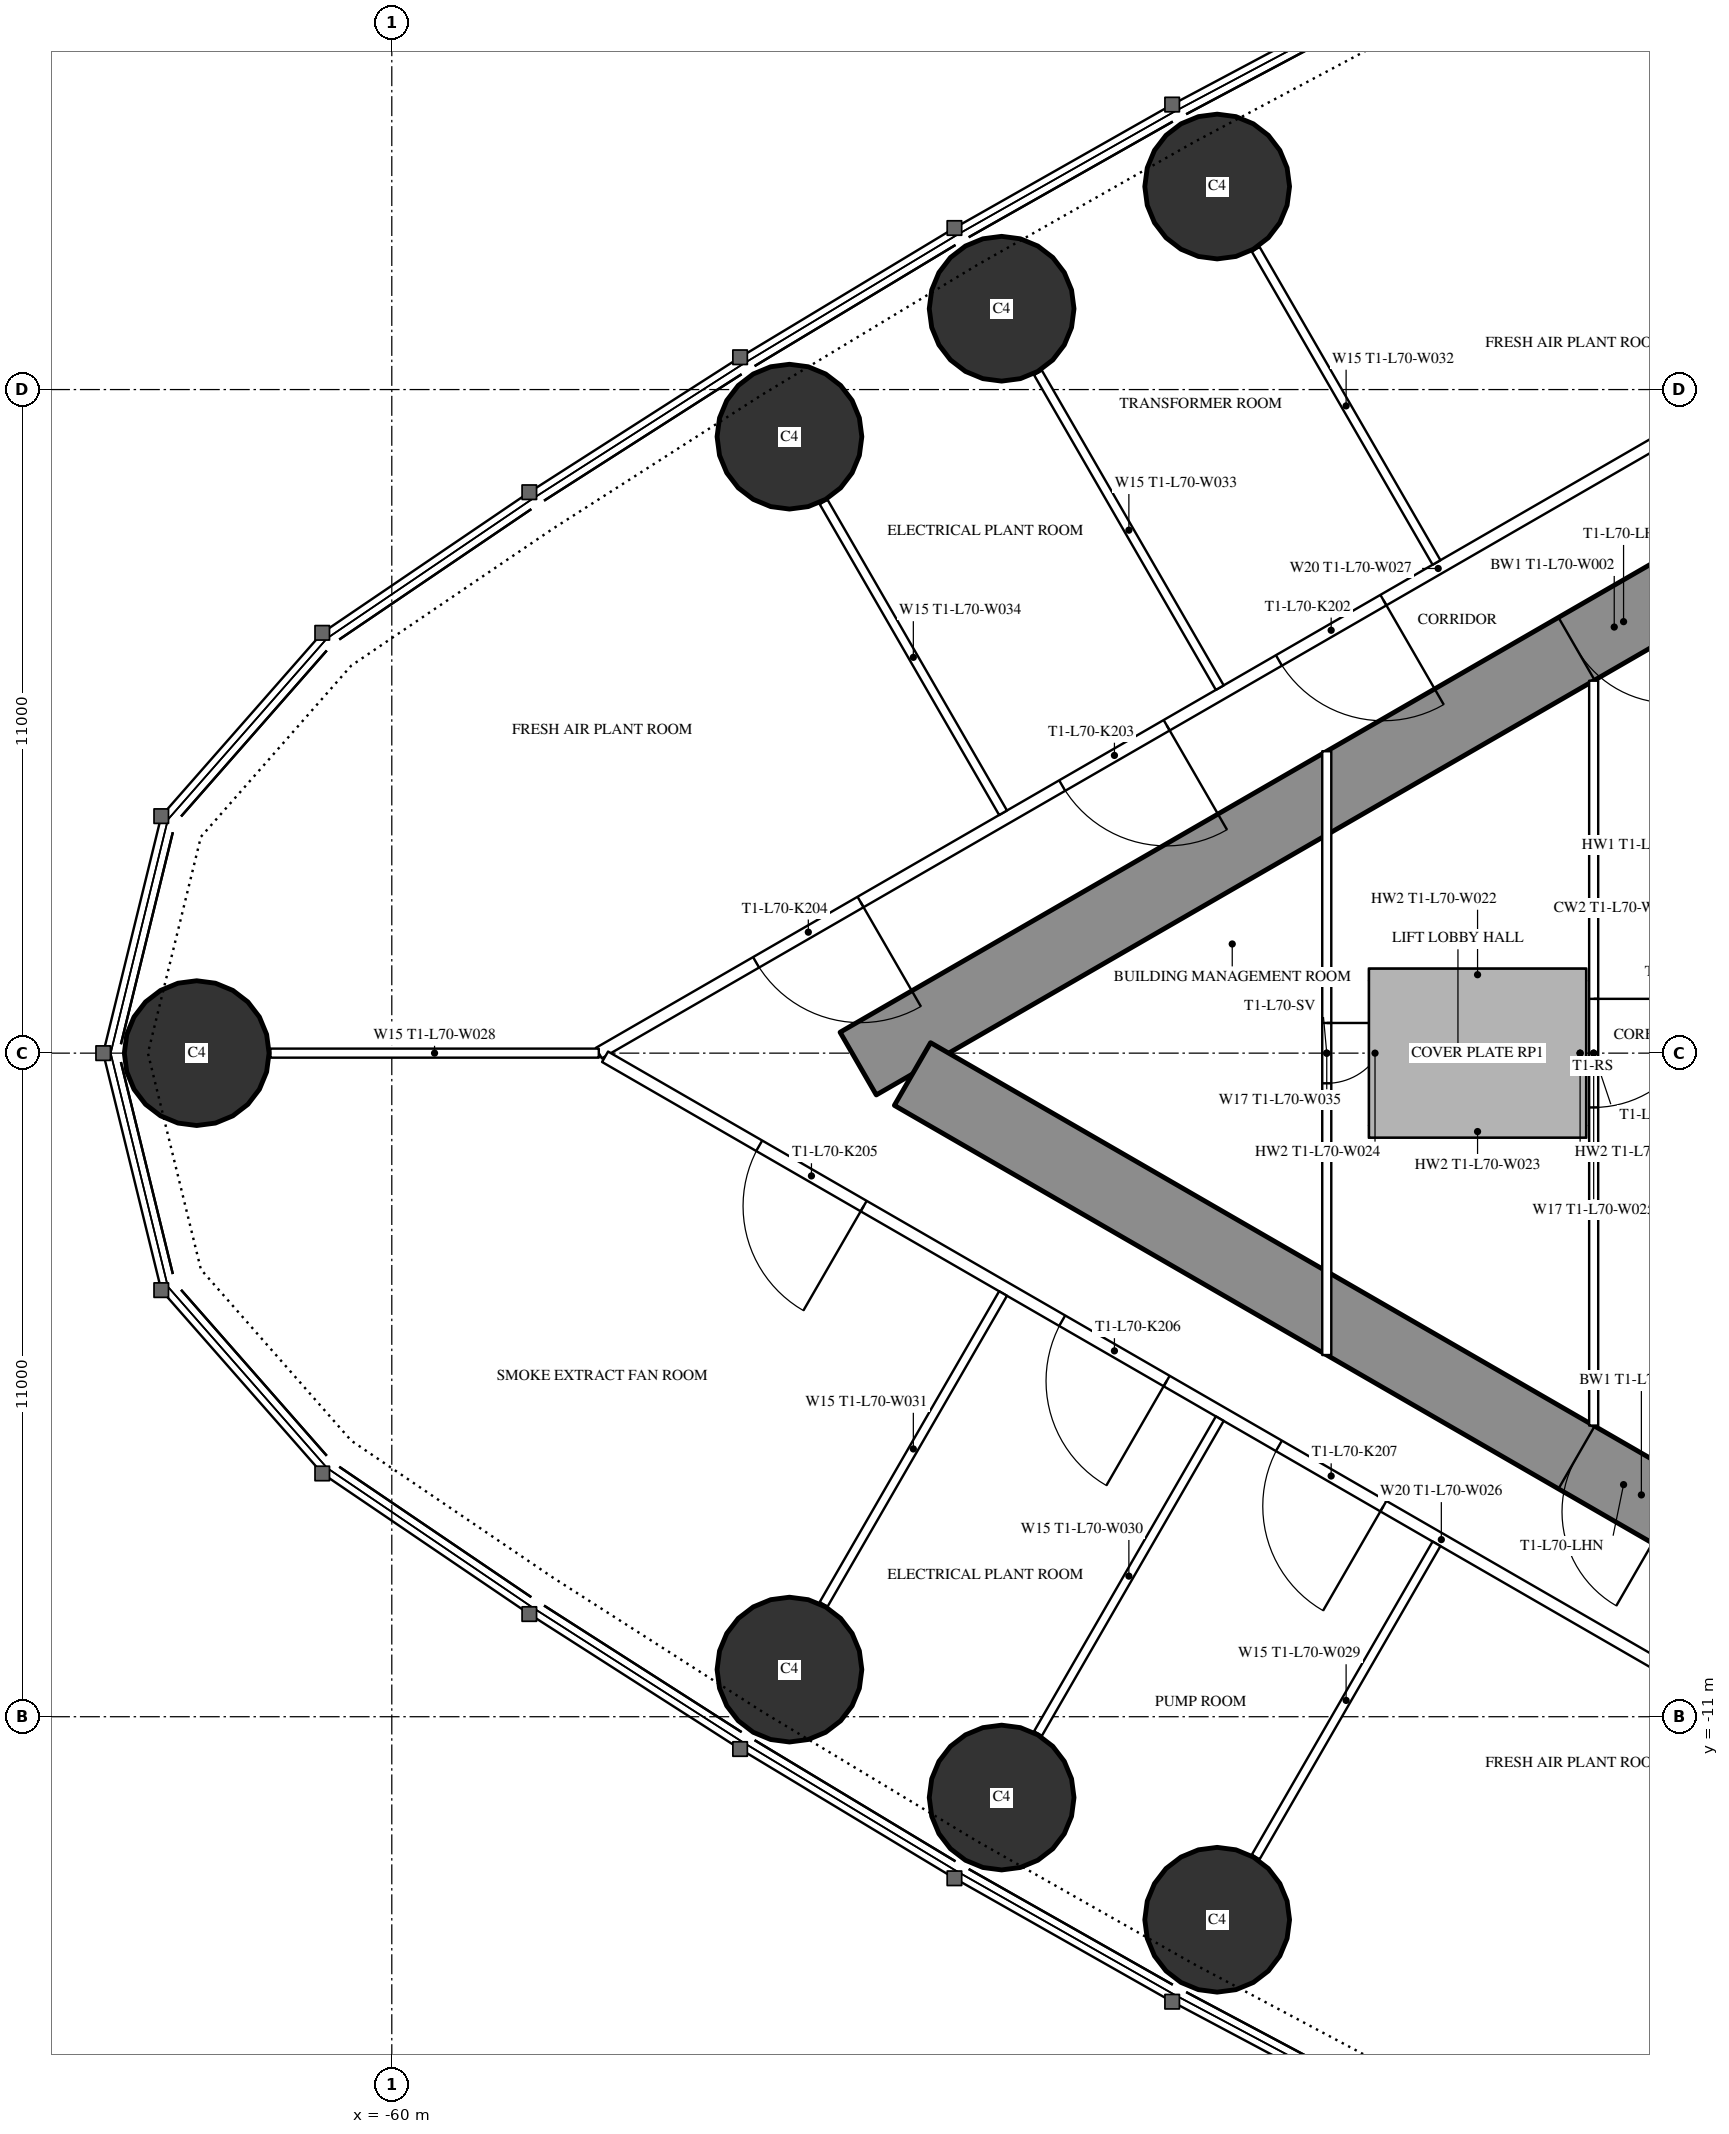
"""IFC4 building model, lengths in metres.
Left out: names, types, materials, properties, quantities, classifications, styles, units other than length and angle.
Written with IfcOpenShell. Run it as: python <this file> out.ifc"""

import sys

from ifc_helpers import new_model, si_unit, direction, frame, frame_2d, origin, origin_2d, place, context, subcontext, project, spatial, rectangle, circle, extrude, element, fill, save


model = new_model("IFC4")
c1 = context("Model", 3, precision=1e-05, world=origin(), true_north=direction((0.0, 1.0)))
c2 = subcontext(c1, "Body", "Model", "MODEL_VIEW")
j1 = project(units=[si_unit("LENGTHUNIT", "METRE"), si_unit("PLANEANGLEUNIT", "RADIAN")], contexts=[c1])
p1 = place(None, origin())
s1 = spatial("IfcSite", under=j1, at=p1, CompositionType="ELEMENT")
p2 = place(p1, origin())
s2 = spatial("IfcBuilding", under=s1, at=p2, CompositionType="ELEMENT")
p3 = place(p2, frame((0.0, 0.0, 268.3)))
s3 = spatial("IfcBuildingStorey", under=s2, at=p3, CompositionType="ELEMENT", Elevation=268.3)
for number, where, z_axis, x_axis in (
    (1, (-63.234, 0.0, 0.0), (0.0, 0.0, 1.0), (1.0, 0.0, 0.0)),
    (2, (-53.408, -10.219, 0.0), (0.0, 0.0, 1.0), (1.0, 0.0, 0.0)),
    (3, (-49.89, -12.34, 0.0), (0.0, 0.0, 1.0), (1.0, 0.0, 0.0)),
    (4, (-46.317, -14.365, 0.0), (0.0, 0.0, 1.0), (1.0, 0.0, 0.0)),
    (5, (-46.317, 14.365, 0.0), (0.0, 0.0, 1.0), (1.0, 0.0, 0.0)),
    (6, (-49.89, 12.34, 0.0), (0.0, 0.0, 1.0), (1.0, 0.0, 0.0)),
    (7, (-53.408, 10.219, 0.0), (0.0, 0.0, 1.0), (1.0, 0.0, 0.0)),
):
    element("IfcColumn", number, at=place(p3, frame(where, z_axis=z_axis, x_axis=x_axis)), inside=s3, PredefinedType="COLUMN", context=c2, shape_type="SweptSolid", body=[
        extrude(circle(Radius=1.2, at=origin_2d()), origin(), (0.0, 0.0, 1.0), 5.0),
    ])
p4 = place(p3, frame((-27.2, 14.3, 0.0), z_axis=(0.0, 0.0, 1.0), x_axis=(-0.866026593062, -0.499997940104, 0.0)))
e8 = element("IfcWall", 8, at=p4, inside=s3, PredefinedType="SHEAR", context=c2, shape_type="SweptSolid", body=[
    extrude(rectangle(XDim=28.946, YDim=1.2, at=frame_2d((14.473, 0.0))), origin(), (0.0, 0.0, 1.0), 5.0),
])
p5 = place(p4, frame((4.6, 0.0, 0.0)))
e9 = element("IfcOpeningElement", 9, at=p5, cuts=e8, PredefinedType="OPENING", context=c2, shape_type="SweptSolid", body=[
    extrude(rectangle(XDim=1.0, YDim=2.2, at=frame_2d((0.5, 1.1))), frame((0.0, 0.61, 0.0), z_axis=(0.0, -1.0, 0.0), x_axis=(1.0, 0.0, 0.0)), (0.0, 0.0, 1.0), 1.22),
])
p6 = place(p4, frame((13.395, 0.0, 0.0)))
e10 = element("IfcOpeningElement", 10, at=p6, cuts=e8, PredefinedType="OPENING", context=c2, shape_type="SweptSolid", body=[
    extrude(rectangle(XDim=1.8, YDim=2.2, at=frame_2d((0.9, 1.1))), frame((0.0, 0.61, 0.0), z_axis=(0.0, -1.0, 0.0), x_axis=(1.0, 0.0, 0.0)), (0.0, 0.0, 1.0), 1.22),
])
p7 = place(p3, frame((-27.2, -14.3, 0.0), z_axis=(0.0, 0.0, 1.0), x_axis=(-0.866024021859, 0.500002393557, 0.0)))
e11 = element("IfcWall", 11, at=p7, inside=s3, PredefinedType="SHEAR", context=c2, shape_type="SweptSolid", body=[
    extrude(rectangle(XDim=27.907, YDim=1.2, at=frame_2d((13.954, 0.0))), origin(), (0.0, 0.0, 1.0), 5.0),
])
p8 = place(p7, frame((4.6, 0.0, 0.0)))
e12 = element("IfcOpeningElement", 12, at=p8, cuts=e11, PredefinedType="OPENING", context=c2, shape_type="SweptSolid", body=[
    extrude(rectangle(XDim=1.0, YDim=2.2, at=frame_2d((0.5, 1.1))), frame((0.0, 0.61, 0.0), z_axis=(0.0, -1.0, 0.0), x_axis=(1.0, 0.0, 0.0)), (0.0, 0.0, 1.0), 1.22),
])
p9 = place(p7, frame((13.395, 0.0, 0.0)))
e13 = element("IfcOpeningElement", 13, at=p9, cuts=e11, PredefinedType="OPENING", context=c2, shape_type="SweptSolid", body=[
    extrude(rectangle(XDim=1.8, YDim=2.2, at=frame_2d((0.9, 1.1))), frame((0.0, 0.61, 0.0), z_axis=(0.0, -1.0, 0.0), x_axis=(1.0, 0.0, 0.0)), (0.0, 0.0, 1.0), 1.22),
])
for number, where, z_axis, x_axis in (
    (14, (-43.8, -1.3, 5.0), (0.0, 0.0, 1.0), (1.0, 0.0, 0.0)),
    (15, (-40.2, 1.3, 5.0), (0.0, 0.0, 1.0), (-1.0, 0.0, 0.0)),
):
    element("IfcWall", number, at=place(p3, frame(where, z_axis=z_axis, x_axis=x_axis)), inside=s3, PredefinedType="SOLIDWALL", context=c2, shape_type="SweptSolid", body=[
        extrude(rectangle(XDim=3.6, YDim=0.2, at=frame_2d((1.8, 0.0))), origin(), (0.0, 0.0, 1.0), 2.6),
    ])
p10 = place(p3, frame((-43.7, 1.2, 5.0), z_axis=(0.0, 0.0, 1.0), x_axis=(0.0, -1.0, 0.0)))
e16 = element("IfcWall", 16, at=p10, inside=s3, PredefinedType="SOLIDWALL", context=c2, shape_type="SweptSolid", body=[
    extrude(rectangle(XDim=2.4, YDim=0.2, at=frame_2d((1.2, 0.0))), origin(), (0.0, 0.0, 1.0), 2.6),
])
p11 = place(p3, frame((-40.3, -1.2, 5.0), z_axis=(0.0, 0.0, 1.0), x_axis=(0.0, 1.0, 0.0)))
e17 = element("IfcWall", 17, at=p11, inside=s3, PredefinedType="SOLIDWALL", context=c2, shape_type="SweptSolid", body=[
    extrude(rectangle(XDim=2.4, YDim=0.2, at=frame_2d((1.2, 0.0))), origin(), (0.0, 0.0, 1.0), 2.6),
])
p12 = place(p11, frame((0.7, 0.0, 0.0)))
e18 = element("IfcOpeningElement", 18, at=p12, cuts=e17, PredefinedType="OPENING", context=c2, shape_type="SweptSolid", body=[
    extrude(rectangle(XDim=1.0, YDim=2.2, at=frame_2d((0.5, 1.1))), frame((0.0, 0.11, 0.0), z_axis=(0.0, -1.0, 0.0), x_axis=(1.0, 0.0, 0.0)), (0.0, 0.0, 1.0), 0.22),
])
p13 = place(p3, frame((-28.737, 16.068, 0.0), z_axis=(0.0, 0.0, 1.0), x_axis=(-0.866026057212, -0.499998868229, 0.0)))
e19 = element("IfcWall", 19, at=p13, inside=s3, PredefinedType="PARTITIONING", context=c2, shape_type="SweptSolid", body=[
    extrude(rectangle(XDim=32.137, YDim=0.2, at=frame_2d((16.068, 0.0))), origin(), (0.0, 0.0, 1.0), 4.7),
])
p14 = place(p13, frame((7.134, 0.0, 0.0)))
e20 = element("IfcOpeningElement", 20, at=p14, cuts=e19, PredefinedType="OPENING", context=c2, shape_type="SweptSolid", body=[
    extrude(rectangle(XDim=2.0, YDim=2.4, at=frame_2d((1.0, 1.2))), frame((0.0, 0.11, 0.0), z_axis=(0.0, -1.0, 0.0), x_axis=(1.0, 0.0, 0.0)), (0.0, 0.0, 1.0), 0.22),
])
p15 = place(p13, frame((17.117, 0.0, 0.0)))
e21 = element("IfcOpeningElement", 21, at=p15, cuts=e19, PredefinedType="OPENING", context=c2, shape_type="SweptSolid", body=[
    extrude(rectangle(XDim=2.0, YDim=2.4, at=frame_2d((1.0, 1.2))), frame((0.0, 0.11, 0.0), z_axis=(0.0, -1.0, 0.0), x_axis=(1.0, 0.0, 0.0)), (0.0, 0.0, 1.0), 0.22),
])
p16 = place(p13, frame((21.266, 0.0, 0.0)))
e22 = element("IfcOpeningElement", 22, at=p16, cuts=e19, PredefinedType="OPENING", context=c2, shape_type="SweptSolid", body=[
    extrude(rectangle(XDim=2.0, YDim=2.4, at=frame_2d((1.0, 1.2))), frame((0.0, 0.11, 0.0), z_axis=(0.0, -1.0, 0.0), x_axis=(1.0, 0.0, 0.0)), (0.0, 0.0, 1.0), 0.22),
])
p17 = place(p13, frame((27.126, 0.0, 0.0)))
e23 = element("IfcOpeningElement", 23, at=p17, cuts=e19, PredefinedType="OPENING", context=c2, shape_type="SweptSolid", body=[
    extrude(rectangle(XDim=2.0, YDim=2.4, at=frame_2d((1.0, 1.2))), frame((0.0, 0.11, 0.0), z_axis=(0.0, -1.0, 0.0), x_axis=(1.0, 0.0, 0.0)), (0.0, 0.0, 1.0), 0.22),
])
p18 = place(p3, frame((-28.737, -16.068, 0.0), z_axis=(0.0, 0.0, 1.0), x_axis=(-0.866026220747, 0.499998584977, 0.0)))
e24 = element("IfcWall", 24, at=p18, inside=s3, PredefinedType="PARTITIONING", context=c2, shape_type="SweptSolid", body=[
    extrude(rectangle(XDim=32.017, YDim=0.2, at=frame_2d((16.008, 0.0))), origin(), (0.0, 0.0, 1.0), 4.7),
])
p19 = place(p18, frame((27.066, 0.0, 0.0)))
e25 = element("IfcOpeningElement", 25, at=p19, cuts=e24, PredefinedType="OPENING", context=c2, shape_type="SweptSolid", body=[
    extrude(rectangle(XDim=2.0, YDim=2.4, at=frame_2d((1.0, 1.2))), frame((0.0, 0.11, 0.0), z_axis=(0.0, -1.0, 0.0), x_axis=(1.0, 0.0, 0.0)), (0.0, 0.0, 1.0), 0.22),
])
p20 = place(p18, frame((21.266, 0.0, 0.0)))
e26 = element("IfcOpeningElement", 26, at=p20, cuts=e24, PredefinedType="OPENING", context=c2, shape_type="SweptSolid", body=[
    extrude(rectangle(XDim=2.0, YDim=2.4, at=frame_2d((1.0, 1.2))), frame((0.0, 0.11, 0.0), z_axis=(0.0, -1.0, 0.0), x_axis=(1.0, 0.0, 0.0)), (0.0, 0.0, 1.0), 0.22),
])
p21 = place(p18, frame((17.117, 0.0, 0.0)))
e27 = element("IfcOpeningElement", 27, at=p21, cuts=e24, PredefinedType="OPENING", context=c2, shape_type="SweptSolid", body=[
    extrude(rectangle(XDim=2.0, YDim=2.4, at=frame_2d((1.0, 1.2))), frame((0.0, 0.11, 0.0), z_axis=(0.0, -1.0, 0.0), x_axis=(1.0, 0.0, 0.0)), (0.0, 0.0, 1.0), 0.22),
])
p22 = place(p18, frame((7.134, 0.0, 0.0)))
e28 = element("IfcOpeningElement", 28, at=p22, cuts=e24, PredefinedType="OPENING", context=c2, shape_type="SweptSolid", body=[
    extrude(rectangle(XDim=2.0, YDim=2.4, at=frame_2d((1.0, 1.2))), frame((0.0, 0.11, 0.0), z_axis=(0.0, -1.0, 0.0), x_axis=(1.0, 0.0, 0.0)), (0.0, 0.0, 1.0), 0.22),
])
p23 = place(p3, frame((-42.68, 8.134, 0.0), z_axis=(0.0, 0.0, 1.0), x_axis=(-0.499984479505, 0.866034364361, 0.0)))
e29 = element("IfcWall", 29, at=p23, inside=s3, PredefinedType="PARTITIONING", context=c2, shape_type="SweptSolid", body=[
    extrude(rectangle(XDim=5.995, YDim=0.15, at=frame_2d((2.998, 0.0))), origin(), (0.0, 0.0, 1.0), 3.8),
])
p24 = place(p3, frame((-46.274, 6.059, 0.0), z_axis=(0.0, 0.0, 1.0), x_axis=(-0.500020471368, 0.866013584312, 0.0)))
e30 = element("IfcWall", 30, at=p24, inside=s3, PredefinedType="PARTITIONING", context=c2, shape_type="SweptSolid", body=[
    extrude(rectangle(XDim=6.028, YDim=0.15, at=frame_2d((3.014, 0.0))), origin(), (0.0, 0.0, 1.0), 3.8),
])
p25 = place(p3, frame((-49.866, 3.985, 0.0), z_axis=(0.0, 0.0, 1.0), x_axis=(-0.500000694566, 0.866025002776, 0.0)))
e31 = element("IfcWall", 31, at=p25, inside=s3, PredefinedType="PARTITIONING", context=c2, shape_type="SweptSolid", body=[
    extrude(rectangle(XDim=5.95, YDim=0.15, at=frame_2d((2.975, 0.0))), origin(), (0.0, 0.0, 1.0), 3.8),
])
p26 = place(p3, frame((-42.68, -8.134, 0.0), z_axis=(0.0, 0.0, 1.0), x_axis=(-0.499984479505, -0.866034364361, 0.0)))
e32 = element("IfcWall", 32, at=p26, inside=s3, PredefinedType="PARTITIONING", context=c2, shape_type="SweptSolid", body=[
    extrude(rectangle(XDim=5.995, YDim=0.15, at=frame_2d((2.998, 0.0))), origin(), (0.0, 0.0, 1.0), 3.8),
])
p27 = place(p3, frame((-46.274, -6.059, 0.0), z_axis=(0.0, 0.0, 1.0), x_axis=(-0.500020471368, -0.866013584312, 0.0)))
e33 = element("IfcWall", 33, at=p27, inside=s3, PredefinedType="PARTITIONING", context=c2, shape_type="SweptSolid", body=[
    extrude(rectangle(XDim=6.028, YDim=0.15, at=frame_2d((3.014, 0.0))), origin(), (0.0, 0.0, 1.0), 3.8),
])
p28 = place(p3, frame((-49.866, -3.985, 0.0), z_axis=(0.0, 0.0, 1.0), x_axis=(-0.500000694566, -0.866025002776, 0.0)))
e34 = element("IfcWall", 34, at=p28, inside=s3, PredefinedType="PARTITIONING", context=c2, shape_type="SweptSolid", body=[
    extrude(rectangle(XDim=5.95, YDim=0.15, at=frame_2d((2.975, 0.0))), origin(), (0.0, 0.0, 1.0), 3.8),
])
p29 = place(p3, frame((-56.568, 0.0, 0.0), z_axis=(0.0, 0.0, 1.0), x_axis=(-1.0, 0.0, 0.0)))
e35 = element("IfcWall", 35, at=p29, inside=s3, PredefinedType="PARTITIONING", context=c2, shape_type="SweptSolid", body=[
    extrude(rectangle(XDim=5.446, YDim=0.15, at=frame_2d((2.723, 0.0))), origin(), (0.0, 0.0, 1.0), 3.8),
])
p30 = place(p3, frame((-40.075, 6.174, 0.0), z_axis=(0.0, 0.0, 1.0), x_axis=(0.0, -1.0, 0.0)))
e36 = element("IfcWall", 36, at=p30, inside=s3, PredefinedType="PARTITIONING", context=c2, shape_type="SweptSolid", body=[
    extrude(rectangle(XDim=12.348, YDim=0.15, at=frame_2d((6.174, 0.0))), origin(), (0.0, 0.0, 1.0), 4.7),
])
p31 = place(p30, frame((5.274, 0.0, 0.0)))
e37 = element("IfcOpeningElement", 37, at=p31, cuts=e36, PredefinedType="OPENING", context=c2, shape_type="SweptSolid", body=[
    extrude(rectangle(XDim=1.8, YDim=2.2, at=frame_2d((0.9, 1.1))), frame((0.0, 0.085, 0.0), z_axis=(0.0, -1.0, 0.0), x_axis=(1.0, 0.0, 0.0)), (0.0, 0.0, 1.0), 0.17),
])
p32 = place(p3, frame((-44.5, 5.005, 0.0), z_axis=(0.0, 0.0, 1.0), x_axis=(0.0, -1.0, 0.0)))
e38 = element("IfcWall", 38, at=p32, inside=s3, PredefinedType="PARTITIONING", context=c2, shape_type="SweptSolid", body=[
    extrude(rectangle(XDim=10.009, YDim=0.15, at=frame_2d((5.005, 0.0))), origin(), (0.0, 0.0, 1.0), 3.85),
])
p33 = place(p32, frame((4.505, 0.0, 0.0)))
e39 = element("IfcOpeningElement", 39, at=p33, cuts=e38, PredefinedType="OPENING", context=c2, shape_type="SweptSolid", body=[
    extrude(rectangle(XDim=1.0, YDim=2.2, at=frame_2d((0.5, 1.1))), frame((0.0, 0.085, 0.0), z_axis=(0.0, -1.0, 0.0), x_axis=(1.0, 0.0, 0.0)), (0.0, 0.0, 1.0), 0.17),
])
p34 = place(p12, origin())
e40 = element("IfcDoor", 40, at=p34, inside=s3, OperationType="SINGLE_SWING_LEFT", PredefinedType="DOOR", context=c2, shape_type="SweptSolid", body=[
    extrude(rectangle(XDim=1.0, YDim=2.2, at=frame_2d((0.5, 1.1))), frame((0.0, 0.025, 0.0), z_axis=(0.0, -1.0, 0.0), x_axis=(1.0, 0.0, 0.0)), (0.0, 0.0, 1.0), 0.05),
])
fill(e18, e40)
p35 = place(p15, origin())
e41 = element("IfcDoor", 41, at=p35, inside=s3, OperationType="DOUBLE_DOOR_SINGLE_SWING", PredefinedType="DOOR", context=c2, shape_type="SweptSolid", body=[
    extrude(rectangle(XDim=2.0, YDim=2.4, at=frame_2d((1.0, 1.2))), frame((0.0, 0.025, 0.0), z_axis=(0.0, -1.0, 0.0), x_axis=(1.0, 0.0, 0.0)), (0.0, 0.0, 1.0), 0.05),
])
fill(e21, e41)
p36 = place(p16, origin())
e42 = element("IfcDoor", 42, at=p36, inside=s3, OperationType="DOUBLE_DOOR_SINGLE_SWING", PredefinedType="DOOR", context=c2, shape_type="SweptSolid", body=[
    extrude(rectangle(XDim=2.0, YDim=2.4, at=frame_2d((1.0, 1.2))), frame((0.0, 0.025, 0.0), z_axis=(0.0, -1.0, 0.0), x_axis=(1.0, 0.0, 0.0)), (0.0, 0.0, 1.0), 0.05),
])
fill(e22, e42)
p37 = place(p17, origin())
e43 = element("IfcDoor", 43, at=p37, inside=s3, OperationType="DOUBLE_DOOR_SINGLE_SWING", PredefinedType="DOOR", context=c2, shape_type="SweptSolid", body=[
    extrude(rectangle(XDim=2.0, YDim=2.4, at=frame_2d((1.0, 1.2))), frame((0.0, 0.025, 0.0), z_axis=(0.0, -1.0, 0.0), x_axis=(1.0, 0.0, 0.0)), (0.0, 0.0, 1.0), 0.05),
])
fill(e23, e43)
p38 = place(p19, origin())
e44 = element("IfcDoor", 44, at=p38, inside=s3, OperationType="DOUBLE_DOOR_SINGLE_SWING", PredefinedType="DOOR", context=c2, shape_type="SweptSolid", body=[
    extrude(rectangle(XDim=2.0, YDim=2.4, at=frame_2d((1.0, 1.2))), frame((0.0, 0.025, 0.0), z_axis=(0.0, -1.0, 0.0), x_axis=(1.0, 0.0, 0.0)), (0.0, 0.0, 1.0), 0.05),
])
fill(e25, e44)
p39 = place(p20, origin())
e45 = element("IfcDoor", 45, at=p39, inside=s3, OperationType="DOUBLE_DOOR_SINGLE_SWING", PredefinedType="DOOR", context=c2, shape_type="SweptSolid", body=[
    extrude(rectangle(XDim=2.0, YDim=2.4, at=frame_2d((1.0, 1.2))), frame((0.0, 0.025, 0.0), z_axis=(0.0, -1.0, 0.0), x_axis=(1.0, 0.0, 0.0)), (0.0, 0.0, 1.0), 0.05),
])
fill(e26, e45)
p40 = place(p21, origin())
e46 = element("IfcDoor", 46, at=p40, inside=s3, OperationType="DOUBLE_DOOR_SINGLE_SWING", PredefinedType="DOOR", context=c2, shape_type="SweptSolid", body=[
    extrude(rectangle(XDim=2.0, YDim=2.4, at=frame_2d((1.0, 1.2))), frame((0.0, 0.025, 0.0), z_axis=(0.0, -1.0, 0.0), x_axis=(1.0, 0.0, 0.0)), (0.0, 0.0, 1.0), 0.05),
])
fill(e27, e46)
p41 = place(p31, origin())
e47 = element("IfcDoor", 47, at=p41, inside=s3, OperationType="DOUBLE_DOOR_SINGLE_SWING", PredefinedType="DOOR", context=c2, shape_type="SweptSolid", body=[
    extrude(rectangle(XDim=1.8, YDim=2.2, at=frame_2d((0.9, 1.1))), frame((0.0, 0.025, 0.0), z_axis=(0.0, -1.0, 0.0), x_axis=(1.0, 0.0, 0.0)), (0.0, 0.0, 1.0), 0.05),
])
fill(e37, e47)
p42 = place(p33, origin())
e48 = element("IfcDoor", 48, at=p42, inside=s3, OperationType="SINGLE_SWING_LEFT", PredefinedType="DOOR", context=c2, shape_type="SweptSolid", body=[
    extrude(rectangle(XDim=1.0, YDim=2.2, at=frame_2d((0.5, 1.1))), frame((0.0, 0.025, 0.0), z_axis=(0.0, -1.0, 0.0), x_axis=(1.0, 0.0, 0.0)), (0.0, 0.0, 1.0), 0.05),
])
fill(e39, e48)
p43 = place(p6, origin())
e49 = element("IfcDoor", 49, at=p43, inside=s3, OperationType="DOUBLE_DOOR_SINGLE_SWING", PredefinedType="DOOR", context=c2, shape_type="SweptSolid", body=[
    extrude(rectangle(XDim=1.8, YDim=2.2, at=frame_2d((0.9, 1.1))), frame((0.0, 0.025, 0.0), z_axis=(0.0, -1.0, 0.0), x_axis=(1.0, 0.0, 0.0)), (0.0, 0.0, 1.0), 0.05),
])
fill(e10, e49)
p44 = place(p9, origin())
e50 = element("IfcDoor", 50, at=p44, inside=s3, OperationType="DOUBLE_DOOR_SINGLE_SWING", PredefinedType="DOOR", context=c2, shape_type="SweptSolid", body=[
    extrude(rectangle(XDim=1.8, YDim=2.2, at=frame_2d((0.9, 1.1))), frame((0.0, 0.025, 0.0), z_axis=(0.0, -1.0, 0.0), x_axis=(1.0, 0.0, 0.0)), (0.0, 0.0, 1.0), 0.05),
])
fill(e13, e50)
save(model, sys.argv[1])
